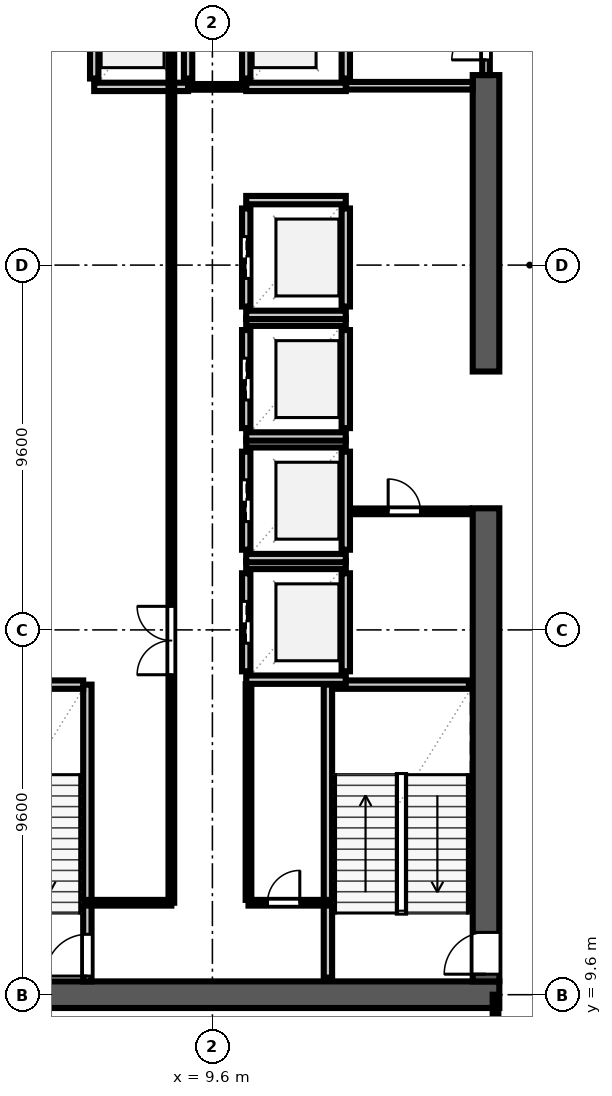
"""IFC4 building model, lengths in metres.
Left out: names, types, materials, properties, quantities, classifications, styles, units other than length and angle.
Written with IfcOpenShell. Run it as: python <this file> out.ifc"""

import sys

from ifc_helpers import new_model, si_unit, direction, frame, frame_2d, origin, place, context, subcontext, project, spatial, rectangle, extrude, element, fill, save


model = new_model("IFC4")
c1 = context("Model", 3, precision=1e-05, world=origin(), true_north=direction((0.0, 1.0)))
c2 = subcontext(c1, "Body", "Model", "MODEL_VIEW")
j1 = project(units=[si_unit("LENGTHUNIT", "METRE"), si_unit("PLANEANGLEUNIT", "RADIAN")], contexts=[c1])
p1 = place(None, origin())
s1 = spatial("IfcSite", under=j1, at=p1, CompositionType="ELEMENT")
p2 = place(p1, origin())
s2 = spatial("IfcBuilding", under=s1, at=p2, CompositionType="ELEMENT")
p3 = place(p2, frame((0.0, 0.0, 194.0)))
s3 = spatial("IfcBuildingStorey", under=s2, at=p3, CompositionType="ELEMENT", Elevation=194.0)
p4 = place(p3, frame((2.55, 9.6, 0.0), z_axis=(0.0, 0.0, 1.0), x_axis=(1.0, 0.0, 0.0)))
e1 = element("IfcWall", 1, at=p4, inside=s3, PredefinedType="SHEAR", context=c2, shape_type="SweptSolid", body=[
    extrude(rectangle(XDim=14.6, YDim=0.7, at=frame_2d((7.3, 0.0))), origin(), (0.0, 0.0, 1.0), 4.74),
])
p5 = place(p3, frame((16.8, 9.95, 0.0), z_axis=(0.0, 0.0, 1.0), x_axis=(0.0, 1.0, 0.0)))
e2 = element("IfcWall", 2, at=p5, inside=s3, PredefinedType="SHEAR", context=c2, shape_type="SweptSolid", body=[
    extrude(rectangle(XDim=12.45, YDim=0.7, at=frame_2d((6.225, 0.0))), origin(), (0.0, 0.0, 1.0), 4.74),
])
p6 = place(p5, frame((0.19, 0.0, 0.0)))
e3 = element("IfcOpeningElement", 3, at=p6, cuts=e2, PredefinedType="OPENING", context=c2, shape_type="SweptSolid", body=[
    extrude(rectangle(XDim=1.1, YDim=2.2, at=frame_2d((0.55, 1.1))), frame((0.0, 0.362, 0.0), z_axis=(0.0, -1.0, 0.0), x_axis=(1.0, 0.0, 0.0)), (0.0, 0.0, 1.0), 0.724),
])
p7 = place(p3, frame((16.8, 26.0, 0.0), z_axis=(0.0, 0.0, 1.0), x_axis=(0.0, 1.0, 0.0)))
e4 = element("IfcWall", 4, at=p7, inside=s3, PredefinedType="SHEAR", context=c2, shape_type="SweptSolid", body=[
    extrude(rectangle(XDim=7.8, YDim=0.7, at=frame_2d((3.9, 0.0))), origin(), (0.0, 0.0, 1.0), 4.74),
])
p8 = place(p3, frame((6.31, 9.95, 0.0), z_axis=(0.0, 0.0, 1.0), x_axis=(0.0, 1.0, 0.0)))
e5 = element("IfcWall", 5, at=p8, inside=s3, PredefinedType="SOLIDWALL", context=c2, shape_type="SweptSolid", body=[
    extrude(rectangle(XDim=7.81, YDim=0.22, at=frame_2d((3.905, 0.0))), origin(), (0.0, 0.0, 1.0), 4.74),
])
p9 = place(p8, frame((0.14, 0.0, 0.0)))
e6 = element("IfcOpeningElement", 6, at=p9, cuts=e5, PredefinedType="OPENING", context=c2, shape_type="SweptSolid", body=[
    extrude(rectangle(XDim=1.1, YDim=2.2, at=frame_2d((0.55, 1.1))), frame((0.0, 0.122, 0.0), z_axis=(0.0, -1.0, 0.0), x_axis=(1.0, 0.0, 0.0)), (0.0, 0.0, 1.0), 0.244),
])
p10 = place(p3, frame((2.65, 17.76, 0.0), z_axis=(0.0, 0.0, 1.0), x_axis=(1.0, 0.0, 0.0)))
e7 = element("IfcWall", 7, at=p10, inside=s3, PredefinedType="SOLIDWALL", context=c2, shape_type="SweptSolid", body=[
    extrude(rectangle(XDim=3.55, YDim=0.22, at=frame_2d((1.775, 0.0))), origin(), (0.0, 0.0, 1.0), 4.74),
])
p11 = place(p3, frame((12.64, 10.05, 0.0), z_axis=(0.0, 0.0, 1.0), x_axis=(0.0, 1.0, 0.0)))
e8 = element("IfcWall", 8, at=p11, inside=s3, PredefinedType="SOLIDWALL", context=c2, shape_type="SweptSolid", body=[
    extrude(rectangle(XDim=7.71, YDim=0.22, at=frame_2d((3.855, 0.0))), origin(), (0.0, 0.0, 1.0), 4.74),
])
p12 = place(p3, frame((12.75, 17.76, 0.0), z_axis=(0.0, 0.0, 1.0), x_axis=(1.0, 0.0, 0.0)))
e9 = element("IfcWall", 9, at=p12, inside=s3, PredefinedType="SOLIDWALL", context=c2, shape_type="SweptSolid", body=[
    extrude(rectangle(XDim=3.6, YDim=0.22, at=frame_2d((1.8, 0.0))), origin(), (0.0, 0.0, 1.0), 4.74),
])
p13 = place(p3, frame((10.49, 18.11, 0.0), z_axis=(0.0, 0.0, 1.0), x_axis=(0.0, 1.0, 0.0)))
e10 = element("IfcWall", 10, at=p13, inside=s3, PredefinedType="SOLIDWALL", context=c2, shape_type="SweptSolid", body=[
    extrude(rectangle(XDim=2.58, YDim=0.22, at=frame_2d((1.29, 0.0))), origin(), (0.0, 0.0, 1.0), 4.74),
])
p14 = place(p13, frame((0.74, 0.0, 0.0)))
e11 = element("IfcOpeningElement", 11, at=p14, cuts=e10, PredefinedType="OPENING", context=c2, shape_type="SweptSolid", body=[
    extrude(rectangle(XDim=1.1, YDim=2.2, at=frame_2d((0.55, 1.1))), frame((0.0, 0.122, 0.0), z_axis=(0.0, -1.0, 0.0), x_axis=(1.0, 0.0, 0.0)), (0.0, 0.0, 1.0), 0.244),
])
p15 = place(p3, frame((13.11, 18.11, 0.0), z_axis=(0.0, 0.0, 1.0), x_axis=(0.0, 1.0, 0.0)))
e12 = element("IfcWall", 12, at=p15, inside=s3, PredefinedType="SOLIDWALL", context=c2, shape_type="SweptSolid", body=[
    extrude(rectangle(XDim=2.58, YDim=0.22, at=frame_2d((1.29, 0.0))), origin(), (0.0, 0.0, 1.0), 4.74),
])
for number, where, z_axis, x_axis in (
    (13, (10.49, 17.89, 0.0), (0.0, 0.0, 1.0), (1.0, 0.0, 0.0)),
    (14, (10.49, 20.91, 0.0), (0.0, 0.0, 1.0), (1.0, 0.0, 0.0)),
):
    element("IfcWall", number, at=place(p3, frame(where, z_axis=z_axis, x_axis=x_axis)), inside=s3, PredefinedType="SOLIDWALL", context=c2, shape_type="SweptSolid", body=[
        extrude(rectangle(XDim=2.62, YDim=0.22, at=frame_2d((1.31, 0.0))), origin(), (0.0, 0.0, 1.0), 4.74),
    ])
p16 = place(p3, frame((10.49, 21.31, 0.0), z_axis=(0.0, 0.0, 1.0), x_axis=(0.0, 1.0, 0.0)))
e15 = element("IfcWall", 15, at=p16, inside=s3, PredefinedType="SOLIDWALL", context=c2, shape_type="SweptSolid", body=[
    extrude(rectangle(XDim=2.58, YDim=0.22, at=frame_2d((1.29, 0.0))), origin(), (0.0, 0.0, 1.0), 4.74),
])
p17 = place(p16, frame((0.74, 0.0, 0.0)))
e16 = element("IfcOpeningElement", 16, at=p17, cuts=e15, PredefinedType="OPENING", context=c2, shape_type="SweptSolid", body=[
    extrude(rectangle(XDim=1.1, YDim=2.2, at=frame_2d((0.55, 1.1))), frame((0.0, 0.122, 0.0), z_axis=(0.0, -1.0, 0.0), x_axis=(1.0, 0.0, 0.0)), (0.0, 0.0, 1.0), 0.244),
])
p18 = place(p3, frame((13.11, 21.31, 0.0), z_axis=(0.0, 0.0, 1.0), x_axis=(0.0, 1.0, 0.0)))
e17 = element("IfcWall", 17, at=p18, inside=s3, PredefinedType="SOLIDWALL", context=c2, shape_type="SweptSolid", body=[
    extrude(rectangle(XDim=2.58, YDim=0.22, at=frame_2d((1.29, 0.0))), origin(), (0.0, 0.0, 1.0), 4.74),
])
for number, where, z_axis, x_axis in (
    (18, (10.49, 21.09, 0.0), (0.0, 0.0, 1.0), (1.0, 0.0, 0.0)),
    (19, (10.49, 24.11, 0.0), (0.0, 0.0, 1.0), (1.0, 0.0, 0.0)),
):
    element("IfcWall", number, at=place(p3, frame(where, z_axis=z_axis, x_axis=x_axis)), inside=s3, PredefinedType="SOLIDWALL", context=c2, shape_type="SweptSolid", body=[
        extrude(rectangle(XDim=2.62, YDim=0.22, at=frame_2d((1.31, 0.0))), origin(), (0.0, 0.0, 1.0), 4.74),
    ])
p19 = place(p3, frame((10.49, 24.51, 0.0), z_axis=(0.0, 0.0, 1.0), x_axis=(0.0, 1.0, 0.0)))
e20 = element("IfcWall", 20, at=p19, inside=s3, PredefinedType="SOLIDWALL", context=c2, shape_type="SweptSolid", body=[
    extrude(rectangle(XDim=2.58, YDim=0.22, at=frame_2d((1.29, 0.0))), origin(), (0.0, 0.0, 1.0), 4.74),
])
p20 = place(p19, frame((0.74, 0.0, 0.0)))
e21 = element("IfcOpeningElement", 21, at=p20, cuts=e20, PredefinedType="OPENING", context=c2, shape_type="SweptSolid", body=[
    extrude(rectangle(XDim=1.1, YDim=2.2, at=frame_2d((0.55, 1.1))), frame((0.0, 0.122, 0.0), z_axis=(0.0, -1.0, 0.0), x_axis=(1.0, 0.0, 0.0)), (0.0, 0.0, 1.0), 0.244),
])
p21 = place(p3, frame((13.11, 24.51, 0.0), z_axis=(0.0, 0.0, 1.0), x_axis=(0.0, 1.0, 0.0)))
e22 = element("IfcWall", 22, at=p21, inside=s3, PredefinedType="SOLIDWALL", context=c2, shape_type="SweptSolid", body=[
    extrude(rectangle(XDim=2.58, YDim=0.22, at=frame_2d((1.29, 0.0))), origin(), (0.0, 0.0, 1.0), 4.74),
])
for number, where, z_axis, x_axis in (
    (23, (10.49, 24.29, 0.0), (0.0, 0.0, 1.0), (1.0, 0.0, 0.0)),
    (24, (10.49, 27.31, 0.0), (0.0, 0.0, 1.0), (1.0, 0.0, 0.0)),
):
    element("IfcWall", number, at=place(p3, frame(where, z_axis=z_axis, x_axis=x_axis)), inside=s3, PredefinedType="SOLIDWALL", context=c2, shape_type="SweptSolid", body=[
        extrude(rectangle(XDim=2.62, YDim=0.22, at=frame_2d((1.31, 0.0))), origin(), (0.0, 0.0, 1.0), 4.74),
    ])
p22 = place(p3, frame((10.49, 27.71, 0.0), z_axis=(0.0, 0.0, 1.0), x_axis=(0.0, 1.0, 0.0)))
e25 = element("IfcWall", 25, at=p22, inside=s3, PredefinedType="SOLIDWALL", context=c2, shape_type="SweptSolid", body=[
    extrude(rectangle(XDim=2.58, YDim=0.22, at=frame_2d((1.29, 0.0))), origin(), (0.0, 0.0, 1.0), 4.74),
])
p23 = place(p22, frame((0.74, 0.0, 0.0)))
e26 = element("IfcOpeningElement", 26, at=p23, cuts=e25, PredefinedType="OPENING", context=c2, shape_type="SweptSolid", body=[
    extrude(rectangle(XDim=1.1, YDim=2.2, at=frame_2d((0.55, 1.1))), frame((0.0, 0.122, 0.0), z_axis=(0.0, -1.0, 0.0), x_axis=(1.0, 0.0, 0.0)), (0.0, 0.0, 1.0), 0.244),
])
p24 = place(p3, frame((13.11, 27.71, 0.0), z_axis=(0.0, 0.0, 1.0), x_axis=(0.0, 1.0, 0.0)))
e27 = element("IfcWall", 27, at=p24, inside=s3, PredefinedType="SOLIDWALL", context=c2, shape_type="SweptSolid", body=[
    extrude(rectangle(XDim=2.58, YDim=0.22, at=frame_2d((1.29, 0.0))), origin(), (0.0, 0.0, 1.0), 4.74),
])
for number, where, z_axis, x_axis in (
    (28, (10.49, 27.49, 0.0), (0.0, 0.0, 1.0), (1.0, 0.0, 0.0)),
    (29, (10.49, 30.51, 0.0), (0.0, 0.0, 1.0), (1.0, 0.0, 0.0)),
):
    element("IfcWall", number, at=place(p3, frame(where, z_axis=z_axis, x_axis=x_axis)), inside=s3, PredefinedType="SOLIDWALL", context=c2, shape_type="SweptSolid", body=[
        extrude(rectangle(XDim=2.62, YDim=0.22, at=frame_2d((1.31, 0.0))), origin(), (0.0, 0.0, 1.0), 4.74),
    ])
for number, where, z_axis, x_axis in (
    (30, (6.49, 33.71, 0.0), (0.0, 0.0, 1.0), (0.0, 1.0, 0.0)),
    (31, (8.96, 33.71, 0.0), (0.0, 0.0, 1.0), (0.0, 1.0, 0.0)),
):
    element("IfcWall", number, at=place(p3, frame(where, z_axis=z_axis, x_axis=x_axis)), inside=s3, PredefinedType="SOLIDWALL", context=c2, shape_type="SweptSolid", body=[
        extrude(rectangle(XDim=2.78, YDim=0.22, at=frame_2d((1.39, 0.0))), origin(), (0.0, 0.0, 1.0), 4.74),
    ])
p25 = place(p3, frame((6.49, 33.49, 0.0), z_axis=(0.0, 0.0, 1.0), x_axis=(1.0, 0.0, 0.0)))
e32 = element("IfcWall", 32, at=p25, inside=s3, PredefinedType="SOLIDWALL", context=c2, shape_type="SweptSolid", body=[
    extrude(rectangle(XDim=2.47, YDim=0.22, at=frame_2d((1.235, 0.0))), origin(), (0.0, 0.0, 1.0), 4.74),
])
for number, where, z_axis, x_axis in (
    (33, (10.49, 33.71, 0.0), (0.0, 0.0, 1.0), (0.0, 1.0, 0.0)),
    (34, (13.11, 33.71, 0.0), (0.0, 0.0, 1.0), (0.0, 1.0, 0.0)),
):
    element("IfcWall", number, at=place(p3, frame(where, z_axis=z_axis, x_axis=x_axis)), inside=s3, PredefinedType="SOLIDWALL", context=c2, shape_type="SweptSolid", body=[
        extrude(rectangle(XDim=2.78, YDim=0.22, at=frame_2d((1.39, 0.0))), origin(), (0.0, 0.0, 1.0), 4.74),
    ])
p26 = place(p3, frame((10.49, 33.49, 0.0), z_axis=(0.0, 0.0, 1.0), x_axis=(1.0, 0.0, 0.0)))
e35 = element("IfcWall", 35, at=p26, inside=s3, PredefinedType="SOLIDWALL", context=c2, shape_type="SweptSolid", body=[
    extrude(rectangle(XDim=2.62, YDim=0.22, at=frame_2d((1.31, 0.0))), origin(), (0.0, 0.0, 1.0), 4.74),
])
p27 = place(p3, frame((13.12, 33.52, 0.0), z_axis=(0.0, 0.0, 1.0), x_axis=(1.0, 0.0, 0.0)))
e36 = element("IfcWall", 36, at=p27, inside=s3, PredefinedType="SOLIDWALL", context=c2, shape_type="SweptSolid", body=[
    extrude(rectangle(XDim=3.33, YDim=0.2, at=frame_2d((1.665, 0.0))), origin(), (0.0, 0.0, 1.0), 4.74),
])
p28 = place(p3, frame((16.8, 33.8, 0.0), z_axis=(0.0, 0.0, 1.0), x_axis=(0.0, 1.0, 0.0)))
e37 = element("IfcWall", 37, at=p28, inside=s3, PredefinedType="SOLIDWALL", context=c2, shape_type="SweptSolid", body=[
    extrude(rectangle(XDim=2.6, YDim=0.2, at=frame_2d((1.3, 0.0))), origin(), (0.0, 0.0, 1.0), 4.74),
])
p29 = place(p28, frame((0.4, 0.0, 0.0)))
e38 = element("IfcOpeningElement", 38, at=p29, cuts=e37, PredefinedType="OPENING", context=c2, shape_type="SweptSolid", body=[
    extrude(rectangle(XDim=1.8, YDim=2.2, at=frame_2d((0.9, 1.1))), frame((0.0, 0.112, 0.0), z_axis=(0.0, -1.0, 0.0), x_axis=(1.0, 0.0, 0.0)), (0.0, 0.0, 1.0), 0.224),
])
p30 = place(p3, frame((8.965, 33.49, 0.0), z_axis=(0.0, 0.0, 1.0), x_axis=(1.0, 0.0, 0.0)))
e39 = element("IfcWall", 39, at=p30, inside=s3, PredefinedType="PARTITIONING", context=c2, shape_type="SweptSolid", body=[
    extrude(rectangle(XDim=1.52, YDim=0.15, at=frame_2d((0.76, 0.0))), origin(), (0.0, 0.0, 1.0), 4.74),
])
p31 = place(p3, frame((10.55, 12.02, 0.0), z_axis=(0.0, 0.0, 1.0), x_axis=(1.0, 0.0, 0.0)))
e40 = element("IfcWall", 40, at=p31, inside=s3, PredefinedType="PARTITIONING", context=c2, shape_type="SweptSolid", body=[
    extrude(rectangle(XDim=2.08, YDim=0.15, at=frame_2d((1.04, 0.0))), origin(), (0.0, 0.0, 1.0), 4.74),
])
p32 = place(p31, frame((0.5, 0.0, 0.0)))
e41 = element("IfcOpeningElement", 41, at=p32, cuts=e40, PredefinedType="OPENING", context=c2, shape_type="SweptSolid", body=[
    extrude(rectangle(XDim=0.85, YDim=2.1, at=frame_2d((0.425, 1.05))), frame((0.0, 0.087, 0.0), z_axis=(0.0, -1.0, 0.0), x_axis=(1.0, 0.0, 0.0)), (0.0, 0.0, 1.0), 0.174),
])
p33 = place(p3, frame((10.55, 12.095, 0.0), z_axis=(0.0, 0.0, 1.0), x_axis=(0.0, 1.0, 0.0)))
e42 = element("IfcWall", 42, at=p33, inside=s3, PredefinedType="PARTITIONING", context=c2, shape_type="SweptSolid", body=[
    extrude(rectangle(XDim=5.68, YDim=0.15, at=frame_2d((2.84, 0.0))), origin(), (0.0, 0.0, 1.0), 4.74),
])
p34 = place(p3, frame((13.225, 22.32, 0.0), z_axis=(0.0, 0.0, 1.0), x_axis=(1.0, 0.0, 0.0)))
e43 = element("IfcWall", 43, at=p34, inside=s3, PredefinedType="PARTITIONING", context=c2, shape_type="SweptSolid", body=[
    extrude(rectangle(XDim=3.12, YDim=0.15, at=frame_2d((1.56, 0.0))), origin(), (0.0, 0.0, 1.0), 4.74),
])
p35 = place(p34, frame((1.0, 0.0, 0.0)))
e44 = element("IfcOpeningElement", 44, at=p35, cuts=e43, PredefinedType="OPENING", context=c2, shape_type="SweptSolid", body=[
    extrude(rectangle(XDim=0.85, YDim=2.1, at=frame_2d((0.425, 1.05))), frame((0.0, 0.087, 0.0), z_axis=(0.0, -1.0, 0.0), x_axis=(1.0, 0.0, 0.0)), (0.0, 0.0, 1.0), 0.174),
])
p36 = place(p3, frame((6.32, 12.02, 0.0), z_axis=(0.0, 0.0, 1.0), x_axis=(1.0, 0.0, 0.0)))
e45 = element("IfcWall", 45, at=p36, inside=s3, PredefinedType="PARTITIONING", context=c2, shape_type="SweptSolid", body=[
    extrude(rectangle(XDim=2.2, YDim=0.15, at=frame_2d((1.1, 0.0))), origin(), (0.0, 0.0, 1.0), 4.74),
])
p37 = place(p3, frame((8.52, 12.02, 0.0), z_axis=(0.0, 0.0, 1.0), x_axis=(0.0, 1.0, 0.0)))
e46 = element("IfcWall", 46, at=p37, inside=s3, PredefinedType="PARTITIONING", context=c2, shape_type="SweptSolid", body=[
    extrude(rectangle(XDim=24.76, YDim=0.15, at=frame_2d((12.38, 0.0))), origin(), (0.0, 0.0, 1.0), 4.74),
])
p38 = place(p37, frame((6.0, 0.0, 0.0)))
e47 = element("IfcOpeningElement", 47, at=p38, cuts=e46, PredefinedType="OPENING", context=c2, shape_type="SweptSolid", body=[
    extrude(rectangle(XDim=1.8, YDim=2.2, at=frame_2d((0.9, 1.1))), frame((0.0, 0.087, 0.0), z_axis=(0.0, -1.0, 0.0), x_axis=(1.0, 0.0, 0.0)), (0.0, 0.0, 1.0), 0.174),
])
p39 = place(p3, frame((17.05, 7.6, 0.0), z_axis=(0.0, 0.0, 1.0), x_axis=(0.0, 1.0, 0.0)))
e48 = element("IfcWall", 48, at=p39, inside=s3, PredefinedType="PARTITIONING", context=c2, shape_type="SweptSolid", body=[
    extrude(rectangle(XDim=2.0, YDim=0.15, at=frame_2d((1.0, 0.0))), origin(), (0.0, 0.0, 1.0), 4.74),
])
p40 = place(p9, origin())
e49 = element("IfcDoor", 49, at=p40, inside=s3, OperationType="SINGLE_SWING_LEFT", PredefinedType="DOOR", context=c2, shape_type="SweptSolid", body=[
    extrude(rectangle(XDim=1.1, YDim=2.2, at=frame_2d((0.55, 1.1))), frame((0.0, 0.025, 0.0), z_axis=(0.0, -1.0, 0.0), x_axis=(1.0, 0.0, 0.0)), (0.0, 0.0, 1.0), 0.05),
])
fill(e6, e49)
p41 = place(p6, origin())
e50 = element("IfcDoor", 50, at=p41, inside=s3, OperationType="SINGLE_SWING_LEFT", PredefinedType="DOOR", context=c2, shape_type="SweptSolid", body=[
    extrude(rectangle(XDim=1.1, YDim=2.2, at=frame_2d((0.55, 1.1))), frame((0.0, 0.025, 0.0), z_axis=(0.0, -1.0, 0.0), x_axis=(1.0, 0.0, 0.0)), (0.0, 0.0, 1.0), 0.05),
])
fill(e3, e50)
p42 = place(p14, origin())
e51 = element("IfcDoor", 51, at=p42, inside=s3, OperationType="DOUBLE_DOOR_SLIDING", PredefinedType="DOOR", context=c2, shape_type="SweptSolid", body=[
    extrude(rectangle(XDim=1.1, YDim=2.2, at=frame_2d((0.55, 1.1))), frame((0.0, 0.025, 0.0), z_axis=(0.0, -1.0, 0.0), x_axis=(1.0, 0.0, 0.0)), (0.0, 0.0, 1.0), 0.05),
])
fill(e11, e51)
p43 = place(p17, origin())
e52 = element("IfcDoor", 52, at=p43, inside=s3, OperationType="DOUBLE_DOOR_SLIDING", PredefinedType="DOOR", context=c2, shape_type="SweptSolid", body=[
    extrude(rectangle(XDim=1.1, YDim=2.2, at=frame_2d((0.55, 1.1))), frame((0.0, 0.025, 0.0), z_axis=(0.0, -1.0, 0.0), x_axis=(1.0, 0.0, 0.0)), (0.0, 0.0, 1.0), 0.05),
])
fill(e16, e52)
p44 = place(p20, origin())
e53 = element("IfcDoor", 53, at=p44, inside=s3, OperationType="DOUBLE_DOOR_SLIDING", PredefinedType="DOOR", context=c2, shape_type="SweptSolid", body=[
    extrude(rectangle(XDim=1.1, YDim=2.2, at=frame_2d((0.55, 1.1))), frame((0.0, 0.025, 0.0), z_axis=(0.0, -1.0, 0.0), x_axis=(1.0, 0.0, 0.0)), (0.0, 0.0, 1.0), 0.05),
])
fill(e21, e53)
p45 = place(p23, origin())
e54 = element("IfcDoor", 54, at=p45, inside=s3, OperationType="DOUBLE_DOOR_SLIDING", PredefinedType="DOOR", context=c2, shape_type="SweptSolid", body=[
    extrude(rectangle(XDim=1.1, YDim=2.2, at=frame_2d((0.55, 1.1))), frame((0.0, 0.025, 0.0), z_axis=(0.0, -1.0, 0.0), x_axis=(1.0, 0.0, 0.0)), (0.0, 0.0, 1.0), 0.05),
])
fill(e26, e54)
p46 = place(p29, origin())
e55 = element("IfcDoor", 55, at=p46, inside=s3, OperationType="DOUBLE_DOOR_SINGLE_SWING", PredefinedType="DOOR", context=c2, shape_type="SweptSolid", body=[
    extrude(rectangle(XDim=1.8, YDim=2.2, at=frame_2d((0.9, 1.1))), frame((0.0, 0.025, 0.0), z_axis=(0.0, -1.0, 0.0), x_axis=(1.0, 0.0, 0.0)), (0.0, 0.0, 1.0), 0.05),
])
fill(e38, e55)
p47 = place(p32, origin())
e56 = element("IfcDoor", 56, at=p47, inside=s3, OperationType="SINGLE_SWING_RIGHT", PredefinedType="DOOR", context=c2, shape_type="SweptSolid", body=[
    extrude(rectangle(XDim=0.85, YDim=2.1, at=frame_2d((0.425, 1.05))), frame((0.0, 0.025, 0.0), z_axis=(0.0, -1.0, 0.0), x_axis=(1.0, 0.0, 0.0)), (0.0, 0.0, 1.0), 0.05),
])
fill(e41, e56)
p48 = place(p35, origin())
e57 = element("IfcDoor", 57, at=p48, inside=s3, OperationType="SINGLE_SWING_LEFT", PredefinedType="DOOR", context=c2, shape_type="SweptSolid", body=[
    extrude(rectangle(XDim=0.85, YDim=2.1, at=frame_2d((0.425, 1.05))), frame((0.0, 0.025, 0.0), z_axis=(0.0, -1.0, 0.0), x_axis=(1.0, 0.0, 0.0)), (0.0, 0.0, 1.0), 0.05),
])
fill(e44, e57)
p49 = place(p38, origin())
e58 = element("IfcDoor", 58, at=p49, inside=s3, OperationType="DOUBLE_DOOR_SINGLE_SWING", PredefinedType="DOOR", context=c2, shape_type="SweptSolid", body=[
    extrude(rectangle(XDim=1.8, YDim=2.2, at=frame_2d((0.9, 1.1))), frame((0.0, 0.025, 0.0), z_axis=(0.0, -1.0, 0.0), x_axis=(1.0, 0.0, 0.0)), (0.0, 0.0, 1.0), 0.05),
])
fill(e47, e58)
save(model, sys.argv[1])
